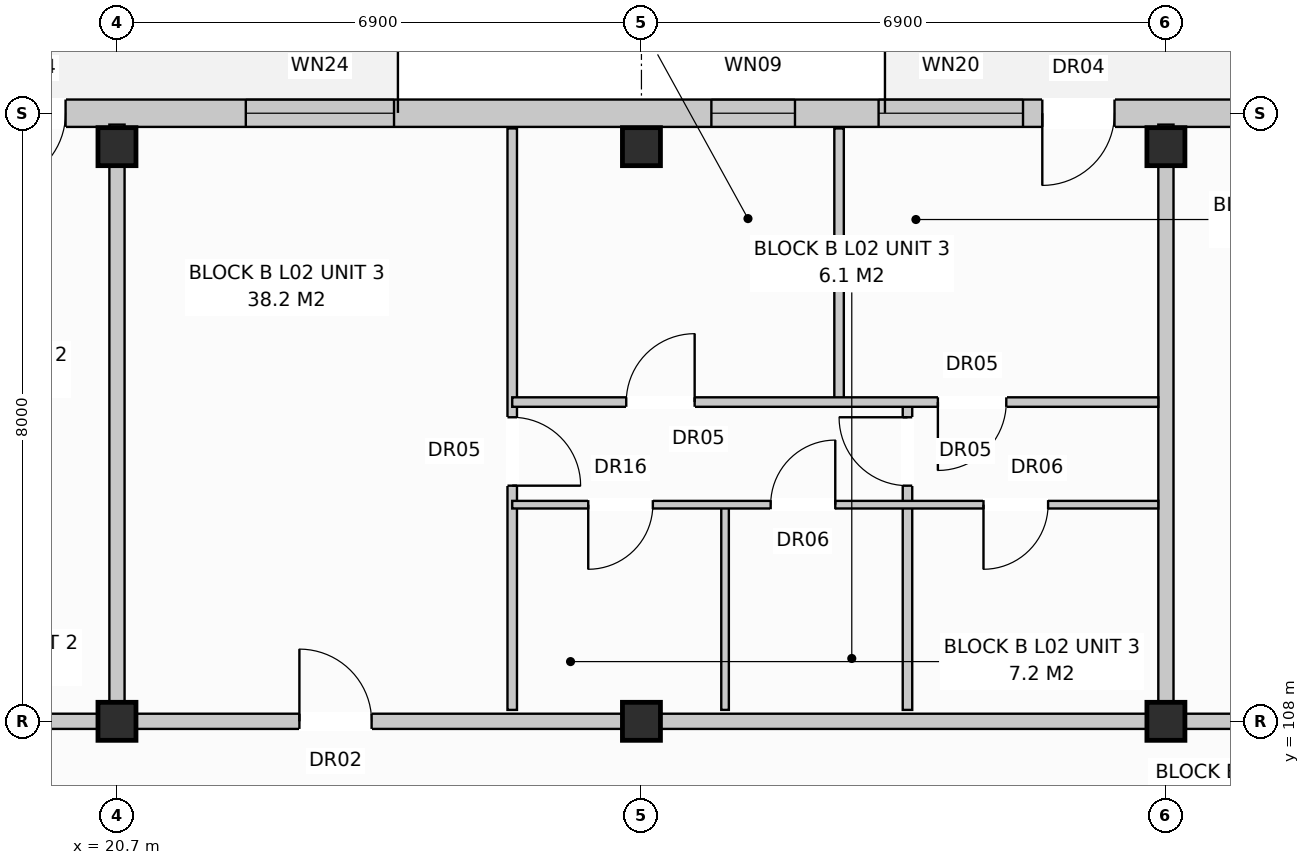
"""IFC4 building model, lengths in metres.
Left out: names, types, materials, properties, quantities, classifications, styles, units other than length and angle.
Written with IfcOpenShell. Run it as: python <this file> out.ifc"""

import sys

from ifc_helpers import new_model, si_unit, direction, frame, frame_2d, origin, origin_with_axes, origin_2d, place, context, subcontext, project, spatial, rectangle, extrude, element, fill, save


model = new_model("IFC4")
c1 = context("Model", 3, precision=1e-05, world=origin(), true_north=direction((0.0, 1.0)))
c2 = subcontext(c1, "Body", "Model", "MODEL_VIEW")
j1 = project(units=[si_unit("LENGTHUNIT", "METRE"), si_unit("PLANEANGLEUNIT", "RADIAN")], contexts=[c1])
p1 = place(None, origin())
s1 = spatial("IfcSite", under=j1, at=p1, CompositionType="ELEMENT")
p2 = place(p1, origin())
s2 = spatial("IfcBuilding", under=s1, at=p2, CompositionType="ELEMENT")
p3 = place(p2, frame((0.0, 0.0, 8.0)))
s3 = spatial("IfcBuildingStorey", under=s2, at=p3, CompositionType="ELEMENT", Elevation=8.0)
for number, where, z_axis, x_axis in (
    (1, (20.7, 108.0, 0.0), (0.0, 0.0, 1.0), (1.0, 0.0, 0.0)),
    (2, (20.7, 115.56, 0.0), (0.0, 0.0, 1.0), (1.0, 0.0, 0.0)),
    (3, (27.6, 108.0, 0.0), (0.0, 0.0, 1.0), (1.0, 0.0, 0.0)),
    (4, (27.6, 115.56, 0.0), (0.0, 0.0, 1.0), (1.0, 0.0, 0.0)),
    (5, (34.5, 108.0, 0.0), (0.0, 0.0, 1.0), (1.0, 0.0, 0.0)),
    (6, (34.5, 115.56, 0.0), (0.0, 0.0, 1.0), (1.0, 0.0, 0.0)),
):
    element("IfcColumn", number, at=place(p3, frame(where, z_axis=z_axis, x_axis=x_axis)), inside=s3, PredefinedType="COLUMN", context=c2, shape_type="SweptSolid", body=[
        extrude(rectangle(XDim=0.5, YDim=0.5, at=origin_2d()), origin(), (0.0, 0.0, 1.0), 3.2),
    ])
p4 = place(p3, frame((0.17, 116.0, 0.0), z_axis=(0.0, 0.0, 1.0), x_axis=(1.0, 0.0, 0.0)))
e7 = element("IfcWall", 7, at=p4, inside=s3, PredefinedType="STANDARD", context=c2, shape_type="SweptSolid", body=[
    extrude(rectangle(XDim=54.86, YDim=0.36, at=frame_2d((27.43, 0.0))), origin(), (0.0, 0.0, 1.0), 2.94),
])
p5 = place(p4, frame((5.1, 0.0, 0.0)))
e8 = element("IfcOpeningElement", 8, at=p5, cuts=e7, PredefinedType="OPENING", context=c2, shape_type="SweptSolid", body=[
    extrude(rectangle(XDim=0.95, YDim=2.1, at=frame_2d((0.475, 1.05))), frame((0.0, 0.192, 0.0), z_axis=(0.0, -1.0, 0.0), x_axis=(1.0, 0.0, 0.0)), (0.0, 0.0, 1.0), 0.384),
])
p6 = place(p4, frame((18.904, 0.0, 0.0)))
e9 = element("IfcOpeningElement", 9, at=p6, cuts=e7, PredefinedType="OPENING", context=c2, shape_type="SweptSolid", body=[
    extrude(rectangle(XDim=0.95, YDim=2.1, at=frame_2d((0.475, 1.05))), frame((0.0, 0.192, 0.0), z_axis=(0.0, -1.0, 0.0), x_axis=(1.0, 0.0, 0.0)), (0.0, 0.0, 1.0), 0.384),
])
p7 = place(p4, frame((32.704, 0.0, 0.0)))
e10 = element("IfcOpeningElement", 10, at=p7, cuts=e7, PredefinedType="OPENING", context=c2, shape_type="SweptSolid", body=[
    extrude(rectangle(XDim=0.95, YDim=2.1, at=frame_2d((0.475, 1.05))), frame((0.0, 0.192, 0.0), z_axis=(0.0, -1.0, 0.0), x_axis=(1.0, 0.0, 0.0)), (0.0, 0.0, 1.0), 0.384),
])
p8 = place(p4, frame((44.626, 0.0, 0.0)))
e11 = element("IfcOpeningElement", 11, at=p8, cuts=e7, PredefinedType="OPENING", context=c2, shape_type="SweptSolid", body=[
    extrude(rectangle(XDim=0.95, YDim=2.1, at=frame_2d((0.475, 1.05))), frame((0.0, 0.192, 0.0), z_axis=(0.0, -1.0, 0.0), x_axis=(1.0, 0.0, 0.0)), (0.0, 0.0, 1.0), 0.384),
])
p9 = place(p4, frame((1.25, 0.0, 0.72)))
e12 = element("IfcOpeningElement", 12, at=p9, cuts=e7, PredefinedType="OPENING", context=c2, shape_type="SweptSolid", body=[
    extrude(rectangle(XDim=1.1, YDim=1.5, at=frame_2d((0.55, 0.75))), frame((0.0, 0.192, 0.0), z_axis=(0.0, -1.0, 0.0), x_axis=(1.0, 0.0, 0.0)), (0.0, 0.0, 1.0), 0.384),
])
p10 = place(p4, frame((7.925, 0.0, 0.8)))
e13 = element("IfcOpeningElement", 13, at=p10, cuts=e7, PredefinedType="OPENING", context=c2, shape_type="SweptSolid", body=[
    extrude(rectangle(XDim=1.95, YDim=1.65, at=frame_2d((0.975, 0.825))), frame((0.0, 0.192, 0.0), z_axis=(0.0, -1.0, 0.0), x_axis=(1.0, 0.0, 0.0)), (0.0, 0.0, 1.0), 0.384),
])
p11 = place(p4, frame((11.65, 0.0, 0.72)))
e14 = element("IfcOpeningElement", 14, at=p11, cuts=e7, PredefinedType="OPENING", context=c2, shape_type="SweptSolid", body=[
    extrude(rectangle(XDim=1.1, YDim=1.5, at=frame_2d((0.55, 0.75))), frame((0.0, 0.192, 0.0), z_axis=(0.0, -1.0, 0.0), x_axis=(1.0, 0.0, 0.0)), (0.0, 0.0, 1.0), 0.384),
])
p12 = place(p4, frame((16.75, 0.0, 0.8)))
e15 = element("IfcOpeningElement", 15, at=p12, cuts=e7, PredefinedType="OPENING", context=c2, shape_type="SweptSolid", body=[
    extrude(rectangle(XDim=1.9, YDim=1.85, at=frame_2d((0.95, 0.925))), frame((0.0, 0.192, 0.0), z_axis=(0.0, -1.0, 0.0), x_axis=(1.0, 0.0, 0.0)), (0.0, 0.0, 1.0), 0.384),
])
p13 = place(p4, frame((22.225, 0.0, 0.8)))
e16 = element("IfcOpeningElement", 16, at=p13, cuts=e7, PredefinedType="OPENING", context=c2, shape_type="SweptSolid", body=[
    extrude(rectangle(XDim=1.95, YDim=1.65, at=frame_2d((0.975, 0.825))), frame((0.0, 0.192, 0.0), z_axis=(0.0, -1.0, 0.0), x_axis=(1.0, 0.0, 0.0)), (0.0, 0.0, 1.0), 0.384),
])
p14 = place(p4, frame((28.35, 0.0, 0.72)))
e17 = element("IfcOpeningElement", 17, at=p14, cuts=e7, PredefinedType="OPENING", context=c2, shape_type="SweptSolid", body=[
    extrude(rectangle(XDim=1.1, YDim=1.5, at=frame_2d((0.55, 0.75))), frame((0.0, 0.192, 0.0), z_axis=(0.0, -1.0, 0.0), x_axis=(1.0, 0.0, 0.0)), (0.0, 0.0, 1.0), 0.384),
])
p15 = place(p4, frame((30.55, 0.0, 0.8)))
e18 = element("IfcOpeningElement", 18, at=p15, cuts=e7, PredefinedType="OPENING", context=c2, shape_type="SweptSolid", body=[
    extrude(rectangle(XDim=1.9, YDim=1.85, at=frame_2d((0.95, 0.925))), frame((0.0, 0.192, 0.0), z_axis=(0.0, -1.0, 0.0), x_axis=(1.0, 0.0, 0.0)), (0.0, 0.0, 1.0), 0.384),
])
p16 = place(p4, frame((36.525, 0.0, 0.8)))
e19 = element("IfcOpeningElement", 19, at=p16, cuts=e7, PredefinedType="OPENING", context=c2, shape_type="SweptSolid", body=[
    extrude(rectangle(XDim=1.95, YDim=1.65, at=frame_2d((0.975, 0.825))), frame((0.0, 0.192, 0.0), z_axis=(0.0, -1.0, 0.0), x_axis=(1.0, 0.0, 0.0)), (0.0, 0.0, 1.0), 0.384),
])
p17 = place(p4, frame((42.65, 0.0, 0.72)))
e20 = element("IfcOpeningElement", 20, at=p17, cuts=e7, PredefinedType="OPENING", context=c2, shape_type="SweptSolid", body=[
    extrude(rectangle(XDim=1.1, YDim=1.5, at=frame_2d((0.55, 0.75))), frame((0.0, 0.192, 0.0), z_axis=(0.0, -1.0, 0.0), x_axis=(1.0, 0.0, 0.0)), (0.0, 0.0, 1.0), 0.384),
])
p18 = place(p4, frame((48.65, 0.0, 0.72)))
e21 = element("IfcOpeningElement", 21, at=p18, cuts=e7, PredefinedType="OPENING", context=c2, shape_type="SweptSolid", body=[
    extrude(rectangle(XDim=1.9, YDim=1.85, at=frame_2d((0.95, 0.925))), frame((0.0, 0.192, 0.0), z_axis=(0.0, -1.0, 0.0), x_axis=(1.0, 0.0, 0.0)), (0.0, 0.0, 1.0), 0.384),
])
p19 = place(p4, frame((52.45, 0.0, 0.72)))
e22 = element("IfcOpeningElement", 22, at=p19, cuts=e7, PredefinedType="OPENING", context=c2, shape_type="SweptSolid", body=[
    extrude(rectangle(XDim=1.1, YDim=1.5, at=frame_2d((0.55, 0.75))), frame((0.0, 0.192, 0.0), z_axis=(0.0, -1.0, 0.0), x_axis=(1.0, 0.0, 0.0)), (0.0, 0.0, 1.0), 0.384),
])
p20 = place(p3, frame((20.7, 108.15, 0.0), z_axis=(0.0, 0.0, 1.0), x_axis=(0.0, 1.0, 0.0)))
e23 = element("IfcWall", 23, at=p20, inside=s3, PredefinedType="PARTITIONING", context=c2, shape_type="SweptSolid", body=[
    extrude(rectangle(XDim=7.7, YDim=0.2, at=frame_2d((3.85, 0.0))), origin(), (0.0, 0.0, 1.0), 2.94),
])
p21 = place(p3, frame((6.9, 108.0, 0.0), z_axis=(0.0, 0.0, 1.0), x_axis=(1.0, 0.0, 0.0)))
e24 = element("IfcWall", 24, at=p21, inside=s3, PredefinedType="PARTITIONING", context=c2, shape_type="SweptSolid", body=[
    extrude(rectangle(XDim=13.8, YDim=0.2, at=frame_2d((6.9, 0.0))), origin(), (0.0, 0.0, 1.0), 2.38),
])
p22 = place(p21, frame((9.6, 0.0, 0.0)))
e25 = element("IfcOpeningElement", 25, at=p22, cuts=e24, PredefinedType="OPENING", context=c2, shape_type="SweptSolid", body=[
    extrude(rectangle(XDim=0.95, YDim=2.15, at=frame_2d((0.475, 1.075))), frame((0.0, 0.112, 0.0), z_axis=(0.0, -1.0, 0.0), x_axis=(1.0, 0.0, 0.0)), (0.0, 0.0, 1.0), 0.224),
])
p23 = place(p3, frame((34.5, 108.15, 0.0), z_axis=(0.0, 0.0, 1.0), x_axis=(0.0, 1.0, 0.0)))
e26 = element("IfcWall", 26, at=p23, inside=s3, PredefinedType="PARTITIONING", context=c2, shape_type="SweptSolid", body=[
    extrude(rectangle(XDim=7.7, YDim=0.2, at=frame_2d((3.85, 0.0))), origin(), (0.0, 0.0, 1.0), 2.94),
])
p24 = place(p3, frame((20.7, 108.0, 0.0), z_axis=(0.0, 0.0, 1.0), x_axis=(1.0, 0.0, 0.0)))
e27 = element("IfcWall", 27, at=p24, inside=s3, PredefinedType="PARTITIONING", context=c2, shape_type="SweptSolid", body=[
    extrude(rectangle(XDim=13.8, YDim=0.2, at=frame_2d((6.9, 0.0))), origin(), (0.0, 0.0, 1.0), 2.38),
])
p25 = place(p24, frame((2.4, 0.0, 0.0)))
e28 = element("IfcOpeningElement", 28, at=p25, cuts=e27, PredefinedType="OPENING", context=c2, shape_type="SweptSolid", body=[
    extrude(rectangle(XDim=0.95, YDim=2.15, at=frame_2d((0.475, 1.075))), frame((0.0, 0.112, 0.0), z_axis=(0.0, -1.0, 0.0), x_axis=(1.0, 0.0, 0.0)), (0.0, 0.0, 1.0), 0.224),
])
p26 = place(p3, frame((25.9, 108.15, 0.0), z_axis=(0.0, 0.0, 1.0), x_axis=(0.0, 1.0, 0.0)))
e29 = element("IfcWall", 29, at=p26, inside=s3, PredefinedType="PARTITIONING", context=c2, shape_type="SweptSolid", body=[
    extrude(rectangle(XDim=7.65, YDim=0.125, at=frame_2d((3.825, 0.0))), origin(), (0.0, 0.0, 1.0), 2.94),
])
p27 = place(p26, frame((2.95, 0.0, 0.0)))
e30 = element("IfcOpeningElement", 30, at=p27, cuts=e29, PredefinedType="OPENING", context=c2, shape_type="SweptSolid", body=[
    extrude(rectangle(XDim=0.9, YDim=2.1, at=frame_2d((0.45, 1.05))), frame((0.0, 0.074, 0.0), z_axis=(0.0, -1.0, 0.0), x_axis=(1.0, 0.0, 0.0)), (0.0, 0.0, 1.0), 0.149),
])
p28 = place(p3, frame((28.7, 108.15, 0.0), z_axis=(0.0, 0.0, 1.0), x_axis=(0.0, 1.0, 0.0)))
e31 = element("IfcWall", 31, at=p28, inside=s3, PredefinedType="PARTITIONING", context=c2, shape_type="SweptSolid", body=[
    extrude(rectangle(XDim=2.7, YDim=0.1, at=frame_2d((1.35, 0.0))), origin(), (0.0, 0.0, 1.0), 2.94),
])
p29 = place(p3, frame((31.1, 108.15, 0.0), z_axis=(0.0, 0.0, 1.0), x_axis=(0.0, 1.0, 0.0)))
e32 = element("IfcWall", 32, at=p29, inside=s3, PredefinedType="PARTITIONING", context=c2, shape_type="SweptSolid", body=[
    extrude(rectangle(XDim=4.05, YDim=0.125, at=frame_2d((2.025, 0.0))), origin(), (0.0, 0.0, 1.0), 2.94),
])
p30 = place(p29, frame((2.95, 0.0, 0.0)))
e33 = element("IfcOpeningElement", 33, at=p30, cuts=e32, PredefinedType="OPENING", context=c2, shape_type="SweptSolid", body=[
    extrude(rectangle(XDim=0.9, YDim=2.1, at=frame_2d((0.45, 1.05))), frame((0.0, 0.074, 0.0), z_axis=(0.0, -1.0, 0.0), x_axis=(1.0, 0.0, 0.0)), (0.0, 0.0, 1.0), 0.149),
])
p31 = place(p3, frame((30.2, 112.2, 0.0), z_axis=(0.0, 0.0, 1.0), x_axis=(0.0, 1.0, 0.0)))
e34 = element("IfcWall", 34, at=p31, inside=s3, PredefinedType="PARTITIONING", context=c2, shape_type="SweptSolid", body=[
    extrude(rectangle(XDim=3.6, YDim=0.125, at=frame_2d((1.8, 0.0))), origin(), (0.0, 0.0, 1.0), 2.94),
])
p32 = place(p3, frame((25.9, 110.85, 0.0), z_axis=(0.0, 0.0, 1.0), x_axis=(1.0, 0.0, 0.0)))
e35 = element("IfcWall", 35, at=p32, inside=s3, PredefinedType="PARTITIONING", context=c2, shape_type="SweptSolid", body=[
    extrude(rectangle(XDim=8.5, YDim=0.1, at=frame_2d((4.25, 0.0))), origin(), (0.0, 0.0, 1.0), 2.94),
])
p33 = place(p32, frame((1.0, 0.0, 0.0)))
e36 = element("IfcOpeningElement", 36, at=p33, cuts=e35, PredefinedType="OPENING", context=c2, shape_type="SweptSolid", body=[
    extrude(rectangle(XDim=0.85, YDim=2.1, at=frame_2d((0.425, 1.05))), frame((0.0, 0.062, 0.0), z_axis=(0.0, -1.0, 0.0), x_axis=(1.0, 0.0, 0.0)), (0.0, 0.0, 1.0), 0.124),
])
p34 = place(p32, frame((3.4, 0.0, 0.0)))
e37 = element("IfcOpeningElement", 37, at=p34, cuts=e35, PredefinedType="OPENING", context=c2, shape_type="SweptSolid", body=[
    extrude(rectangle(XDim=0.85, YDim=2.05, at=frame_2d((0.425, 1.025))), frame((0.0, 0.062, 0.0), z_axis=(0.0, -1.0, 0.0), x_axis=(1.0, 0.0, 0.0)), (0.0, 0.0, 1.0), 0.124),
])
p35 = place(p32, frame((6.2, 0.0, 0.0)))
e38 = element("IfcOpeningElement", 38, at=p35, cuts=e35, PredefinedType="OPENING", context=c2, shape_type="SweptSolid", body=[
    extrude(rectangle(XDim=0.85, YDim=2.05, at=frame_2d((0.425, 1.025))), frame((0.0, 0.062, 0.0), z_axis=(0.0, -1.0, 0.0), x_axis=(1.0, 0.0, 0.0)), (0.0, 0.0, 1.0), 0.124),
])
p36 = place(p3, frame((25.9, 112.2, 0.0), z_axis=(0.0, 0.0, 1.0), x_axis=(1.0, 0.0, 0.0)))
e39 = element("IfcWall", 39, at=p36, inside=s3, PredefinedType="PARTITIONING", context=c2, shape_type="SweptSolid", body=[
    extrude(rectangle(XDim=8.5, YDim=0.125, at=frame_2d((4.25, 0.0))), origin(), (0.0, 0.0, 1.0), 2.94),
])
p37 = place(p36, frame((1.5, 0.0, 0.0)))
e40 = element("IfcOpeningElement", 40, at=p37, cuts=e39, PredefinedType="OPENING", context=c2, shape_type="SweptSolid", body=[
    extrude(rectangle(XDim=0.9, YDim=2.1, at=frame_2d((0.45, 1.05))), frame((0.0, 0.074, 0.0), z_axis=(0.0, -1.0, 0.0), x_axis=(1.0, 0.0, 0.0)), (0.0, 0.0, 1.0), 0.149),
])
p38 = place(p36, frame((5.6, 0.0, 0.0)))
e41 = element("IfcOpeningElement", 41, at=p38, cuts=e39, PredefinedType="OPENING", context=c2, shape_type="SweptSolid", body=[
    extrude(rectangle(XDim=0.9, YDim=2.1, at=frame_2d((0.45, 1.05))), frame((0.0, 0.074, 0.0), z_axis=(0.0, -1.0, 0.0), x_axis=(1.0, 0.0, 0.0)), (0.0, 0.0, 1.0), 0.149),
])
p39 = place(p3, frame((34.5, 108.0, 0.0), z_axis=(0.0, 0.0, 1.0), x_axis=(1.0, 0.0, 0.0)))
e42 = element("IfcWall", 42, at=p39, inside=s3, PredefinedType="PARTITIONING", context=c2, shape_type="SweptSolid", body=[
    extrude(rectangle(XDim=20.7, YDim=0.2, at=frame_2d((10.35, 0.0))), origin(), (0.0, 0.0, 1.0), 2.38),
])
p40 = place(p39, frame((2.4, 0.0, 0.0)))
e43 = element("IfcOpeningElement", 43, at=p40, cuts=e42, PredefinedType="OPENING", context=c2, shape_type="SweptSolid", body=[
    extrude(rectangle(XDim=0.95, YDim=2.15, at=frame_2d((0.475, 1.075))), frame((0.0, 0.112, 0.0), z_axis=(0.0, -1.0, 0.0), x_axis=(1.0, 0.0, 0.0)), (0.0, 0.0, 1.0), 0.224),
])
p41 = place(p6, frame((0.95, 0.0, 0.0), z_axis=(0.0, 0.0, 1.0), x_axis=(-1.0, 0.0, 0.0)))
e44 = element("IfcDoor", 44, at=p41, inside=s3, OperationType="SINGLE_SWING_LEFT", PredefinedType="DOOR", context=c2, shape_type="SweptSolid", body=[
    extrude(rectangle(XDim=0.95, YDim=2.1, at=frame_2d((0.475, 1.05))), frame((0.0, 0.025, 0.0), z_axis=(0.0, -1.0, 0.0), x_axis=(1.0, 0.0, 0.0)), (0.0, 0.0, 1.0), 0.05),
])
fill(e9, e44)
p42 = place(p7, frame((0.95, 0.0, 0.0), z_axis=(0.0, 0.0, 1.0), x_axis=(-1.0, 0.0, 0.0)))
e45 = element("IfcDoor", 45, at=p42, inside=s3, OperationType="SINGLE_SWING_LEFT", PredefinedType="DOOR", context=c2, shape_type="SweptSolid", body=[
    extrude(rectangle(XDim=0.95, YDim=2.1, at=frame_2d((0.475, 1.05))), frame((0.0, 0.025, 0.0), z_axis=(0.0, -1.0, 0.0), x_axis=(1.0, 0.0, 0.0)), (0.0, 0.0, 1.0), 0.05),
])
fill(e10, e45)
p43 = place(p13, origin_with_axes())
e46 = element("IfcWindow", 46, at=p43, inside=s3, PartitioningType="SINGLE_PANEL", PredefinedType="WINDOW", context=c2, shape_type="SweptSolid", body=[
    extrude(rectangle(XDim=1.95, YDim=1.65, at=frame_2d((0.975, 0.825))), frame((0.0, 0.03, 0.0), z_axis=(0.0, -1.0, 0.0), x_axis=(1.0, 0.0, 0.0)), (0.0, 0.0, 1.0), 0.06),
])
fill(e16, e46)
p44 = place(p14, origin_with_axes())
e47 = element("IfcWindow", 47, at=p44, inside=s3, PartitioningType="SINGLE_PANEL", PredefinedType="WINDOW", context=c2, shape_type="SweptSolid", body=[
    extrude(rectangle(XDim=1.1, YDim=1.5, at=frame_2d((0.55, 0.75))), frame((0.0, 0.03, 0.0), z_axis=(0.0, -1.0, 0.0), x_axis=(1.0, 0.0, 0.0)), (0.0, 0.0, 1.0), 0.06),
])
fill(e17, e47)
p45 = place(p15, origin_with_axes())
e48 = element("IfcWindow", 48, at=p45, inside=s3, PartitioningType="SINGLE_PANEL", PredefinedType="WINDOW", context=c2, shape_type="SweptSolid", body=[
    extrude(rectangle(XDim=1.9, YDim=1.85, at=frame_2d((0.95, 0.925))), frame((0.0, 0.03, 0.0), z_axis=(0.0, -1.0, 0.0), x_axis=(1.0, 0.0, 0.0)), (0.0, 0.0, 1.0), 0.06),
])
fill(e18, e48)
p46 = place(p25, origin_with_axes())
e49 = element("IfcDoor", 49, at=p46, inside=s3, OperationType="SINGLE_SWING_LEFT", PredefinedType="DOOR", context=c2, shape_type="SweptSolid", body=[
    extrude(rectangle(XDim=0.95, YDim=2.15, at=frame_2d((0.475, 1.075))), frame((0.0, 0.025, 0.0), z_axis=(0.0, -1.0, 0.0), x_axis=(1.0, 0.0, 0.0)), (0.0, 0.0, 1.0), 0.05),
])
fill(e28, e49)
p47 = place(p27, frame((0.9, 0.0, 0.0), z_axis=(0.0, 0.0, 1.0), x_axis=(-1.0, 0.0, 0.0)))
e50 = element("IfcDoor", 50, at=p47, inside=s3, OperationType="SINGLE_SWING_LEFT", PredefinedType="DOOR", context=c2, shape_type="SweptSolid", body=[
    extrude(rectangle(XDim=0.9, YDim=2.1, at=frame_2d((0.45, 1.05))), frame((0.0, 0.025, 0.0), z_axis=(0.0, -1.0, 0.0), x_axis=(1.0, 0.0, 0.0)), (0.0, 0.0, 1.0), 0.05),
])
fill(e30, e50)
p48 = place(p30, origin_with_axes())
e51 = element("IfcDoor", 51, at=p48, inside=s3, OperationType="SINGLE_SWING_RIGHT", PredefinedType="DOOR", context=c2, shape_type="SweptSolid", body=[
    extrude(rectangle(XDim=0.9, YDim=2.1, at=frame_2d((0.45, 1.05))), frame((0.0, 0.025, 0.0), z_axis=(0.0, -1.0, 0.0), x_axis=(1.0, 0.0, 0.0)), (0.0, 0.0, 1.0), 0.05),
])
fill(e33, e51)
p49 = place(p33, frame((0.85, 0.0, 0.0), z_axis=(0.0, 0.0, 1.0), x_axis=(-1.0, 0.0, 0.0)))
e52 = element("IfcDoor", 52, at=p49, inside=s3, OperationType="SINGLE_SWING_LEFT", PredefinedType="DOOR", context=c2, shape_type="SweptSolid", body=[
    extrude(rectangle(XDim=0.85, YDim=2.1, at=frame_2d((0.425, 1.05))), frame((0.0, 0.025, 0.0), z_axis=(0.0, -1.0, 0.0), x_axis=(1.0, 0.0, 0.0)), (0.0, 0.0, 1.0), 0.05),
])
fill(e36, e52)
p50 = place(p34, origin_with_axes())
e53 = element("IfcDoor", 53, at=p50, inside=s3, OperationType="SINGLE_SWING_RIGHT", PredefinedType="DOOR", context=c2, shape_type="SweptSolid", body=[
    extrude(rectangle(XDim=0.85, YDim=2.05, at=frame_2d((0.425, 1.025))), frame((0.0, 0.025, 0.0), z_axis=(0.0, -1.0, 0.0), x_axis=(1.0, 0.0, 0.0)), (0.0, 0.0, 1.0), 0.05),
])
fill(e37, e53)
p51 = place(p35, frame((0.85, 0.0, 0.0), z_axis=(0.0, 0.0, 1.0), x_axis=(-1.0, 0.0, 0.0)))
e54 = element("IfcDoor", 54, at=p51, inside=s3, OperationType="SINGLE_SWING_LEFT", PredefinedType="DOOR", context=c2, shape_type="SweptSolid", body=[
    extrude(rectangle(XDim=0.85, YDim=2.05, at=frame_2d((0.425, 1.025))), frame((0.0, 0.025, 0.0), z_axis=(0.0, -1.0, 0.0), x_axis=(1.0, 0.0, 0.0)), (0.0, 0.0, 1.0), 0.05),
])
fill(e38, e54)
p52 = place(p37, origin_with_axes())
e55 = element("IfcDoor", 55, at=p52, inside=s3, OperationType="SINGLE_SWING_RIGHT", PredefinedType="DOOR", context=c2, shape_type="SweptSolid", body=[
    extrude(rectangle(XDim=0.9, YDim=2.1, at=frame_2d((0.45, 1.05))), frame((0.0, 0.025, 0.0), z_axis=(0.0, -1.0, 0.0), x_axis=(1.0, 0.0, 0.0)), (0.0, 0.0, 1.0), 0.05),
])
fill(e40, e55)
p53 = place(p38, frame((0.9, 0.0, 0.0), z_axis=(0.0, 0.0, 1.0), x_axis=(-1.0, 0.0, 0.0)))
e56 = element("IfcDoor", 56, at=p53, inside=s3, OperationType="SINGLE_SWING_LEFT", PredefinedType="DOOR", context=c2, shape_type="SweptSolid", body=[
    extrude(rectangle(XDim=0.9, YDim=2.1, at=frame_2d((0.45, 1.05))), frame((0.0, 0.025, 0.0), z_axis=(0.0, -1.0, 0.0), x_axis=(1.0, 0.0, 0.0)), (0.0, 0.0, 1.0), 0.05),
])
fill(e41, e56)
save(model, sys.argv[1])
